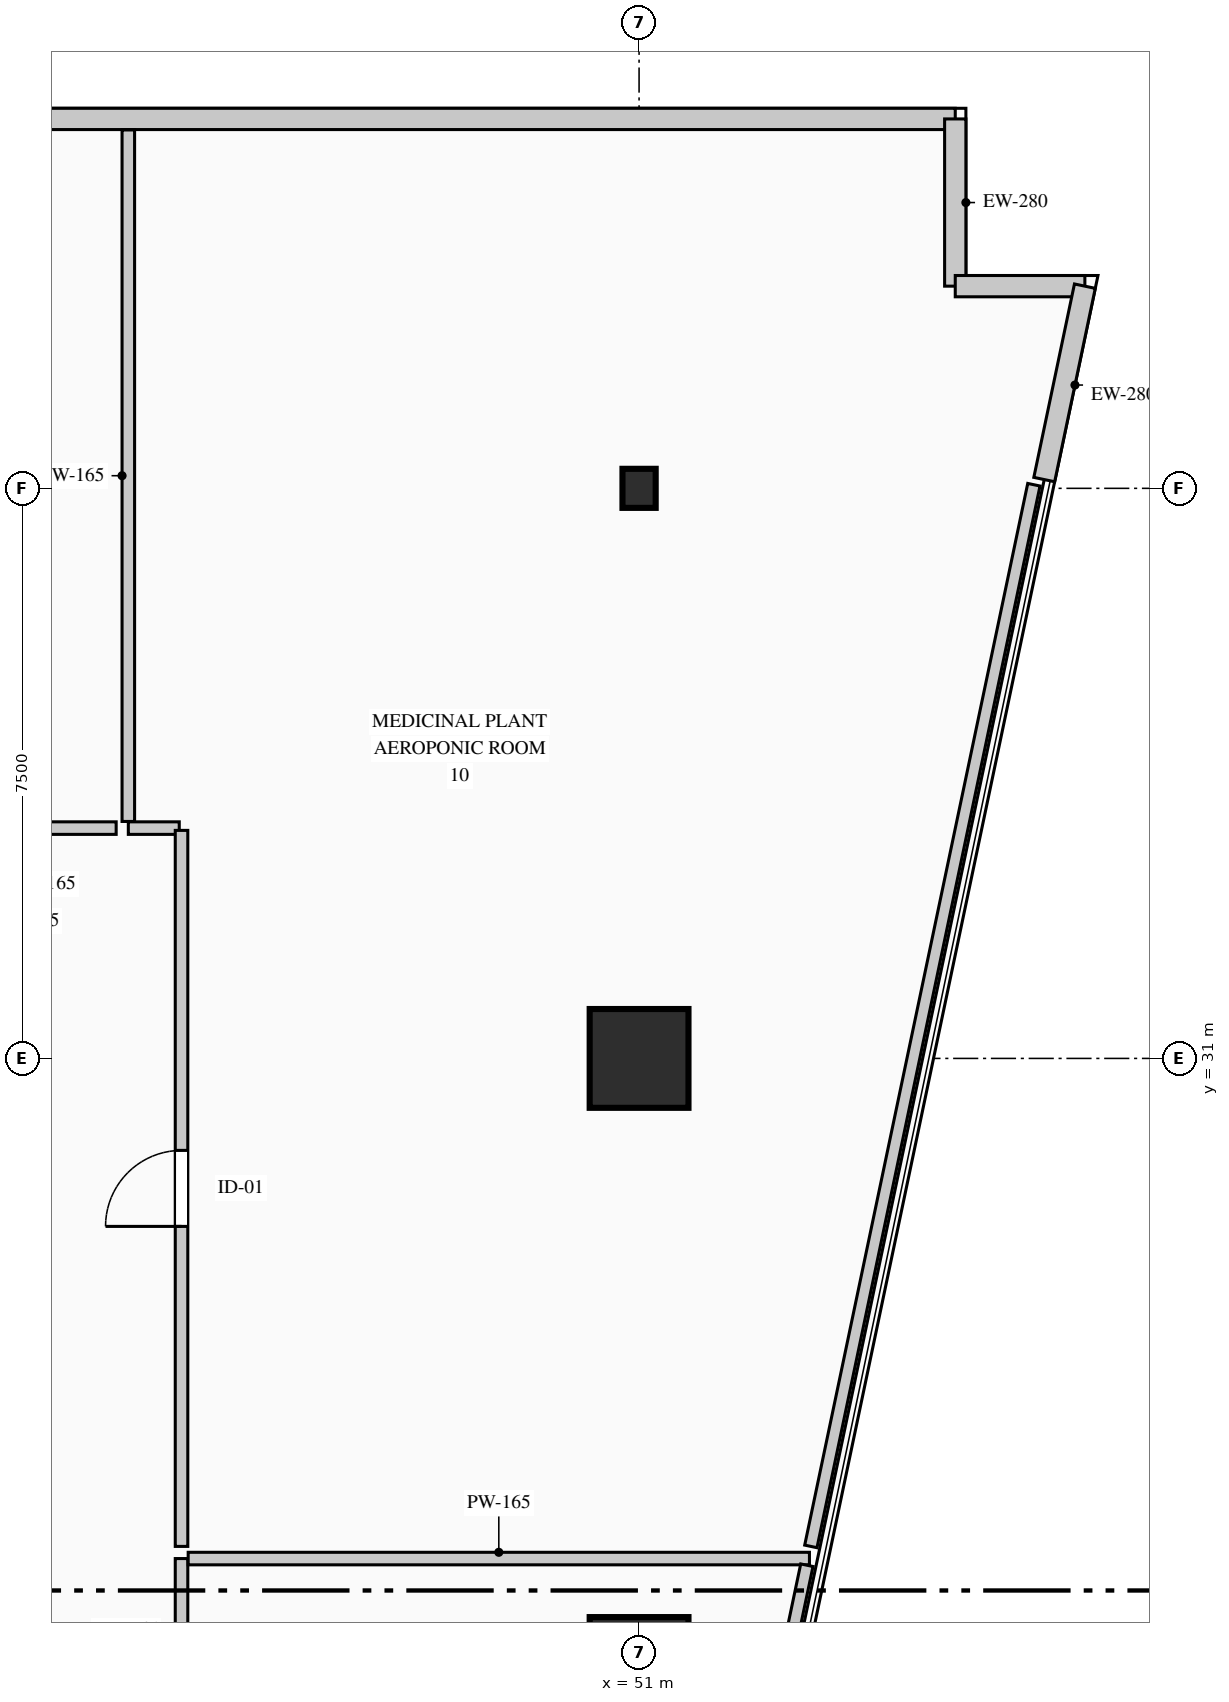
"""IFC4 building model, lengths in metres.
Left out: names, types, materials, properties, quantities, classifications, styles, units other than length and angle.
Written with IfcOpenShell. Run it as: python <this file> out.ifc"""

import sys

from ifc_helpers import new_model, si_unit, direction, frame, frame_2d, origin, origin_2d, place, context, subcontext, project, spatial, rectangle, i_section, extrude, element, fill, save


model = new_model("IFC4")
c1 = context("Model", 3, precision=1e-05, world=origin(), true_north=direction((0.0, 1.0)))
c2 = subcontext(c1, "Body", "Model", "MODEL_VIEW")
j1 = project(units=[si_unit("LENGTHUNIT", "METRE"), si_unit("PLANEANGLEUNIT", "RADIAN")], contexts=[c1])
p1 = place(None, origin())
s1 = spatial("IfcSite", under=j1, at=p1, CompositionType="ELEMENT")
p2 = place(p1, origin())
s2 = spatial("IfcBuilding", under=s1, at=p2, CompositionType="ELEMENT")
p3 = place(p2, frame((0.0, 0.0, 75.4)))
s3 = spatial("IfcBuildingStorey", under=s2, at=p3, CompositionType="ELEMENT", Elevation=75.4)
for number, where, z_axis, x_axis in (
    (1, (51.0, 23.0, 0.0), (0.0, 0.0, 1.0), (1.0, 0.0, 0.0)),
    (2, (51.0, 31.0, 0.0), (0.0, 0.0, 1.0), (1.0, 0.0, 0.0)),
):
    element("IfcColumn", number, at=place(p3, frame(where, z_axis=z_axis, x_axis=x_axis)), inside=s3, PredefinedType="COLUMN", context=c2, shape_type="SweptSolid", body=[
        extrude(rectangle(XDim=1.3, YDim=1.3, at=origin_2d()), origin(), (0.0, 0.0, 1.0), 4.4),
    ])
p4 = place(p3, frame((51.0, 38.5, 0.0), z_axis=(0.0, 0.0, 1.0), x_axis=(1.0, 0.0, 0.0)))
e3 = element("IfcColumn", 3, at=p4, inside=s3, PredefinedType="COLUMN", context=c2, shape_type="SweptSolid", body=[
    extrude(i_section(OverallWidth=0.437, OverallDepth=0.514, WebThickness=0.061, FlangeThickness=0.077, FilletRadius=0.015, at=origin_2d()), origin(), (0.0, 0.0, 1.0), 4.4),
])
p5 = place(p3, frame((4.84, 43.36, 0.0), z_axis=(0.0, 0.0, 1.0), x_axis=(1.0, 0.0, 0.0)))
e4 = element("IfcWall", 4, at=p5, inside=s3, PredefinedType="STANDARD", context=c2, shape_type="SweptSolid", body=[
    extrude(rectangle(XDim=50.32, YDim=0.28, at=frame_2d((25.16, 0.0))), origin(), (0.0, 0.0, 1.0), 4.115),
])
p6 = place(p5, frame((24.26, 0.0, 0.9)))
e5 = element("IfcOpeningElement", 5, at=p6, cuts=e4, PredefinedType="OPENING", context=c2, shape_type="SweptSolid", body=[
    extrude(rectangle(XDim=1.8, YDim=2.1, at=frame_2d((0.9, 1.05))), frame((0.0, 0.15, 0.0), z_axis=(0.0, -1.0, 0.0), x_axis=(1.0, 0.0, 0.0)), (0.0, 0.0, 1.0), 0.3),
])
p7 = place(p3, frame((55.16, 43.36, 0.0), z_axis=(0.0, 0.0, 1.0), x_axis=(0.0, -1.0, 0.0)))
e6 = element("IfcWall", 6, at=p7, inside=s3, PredefinedType="STANDARD", context=c2, shape_type="SweptSolid", body=[
    extrude(rectangle(XDim=2.2, YDim=0.28, at=frame_2d((1.1, 0.0))), origin(), (0.0, 0.0, 1.0), 4.115),
])
p8 = place(p3, frame((55.16, 41.16, 0.0), z_axis=(0.0, 0.0, 1.0), x_axis=(1.0, 0.0, 0.0)))
e7 = element("IfcWall", 7, at=p8, inside=s3, PredefinedType="STANDARD", context=c2, shape_type="SweptSolid", body=[
    extrude(rectangle(XDim=1.705, YDim=0.28, at=frame_2d((0.853, 0.0))), origin(), (0.0, 0.0, 1.0), 4.115),
])
p9 = place(p3, frame((56.865, 41.16, 0.0), z_axis=(0.0, 0.0, 1.0), x_axis=(-0.205551409765, -0.978646319128, 0.0)))
e8 = element("IfcWall", 8, at=p9, inside=s3, PredefinedType="STANDARD", context=c2, shape_type="SweptSolid", body=[
    extrude(rectangle(XDim=2.6, YDim=0.28, at=frame_2d((1.3, 0.0))), origin(), (0.0, 0.0, 1.0), 4.115),
])
p10 = place(p3, frame((44.98, 18.73, 0.0), z_axis=(0.0, 0.0, 1.0), x_axis=(0.0, 1.0, 0.0)))
e9 = element("IfcWall", 9, at=p10, inside=s3, PredefinedType="PARTITIONING", context=c2, shape_type="SweptSolid", body=[
    extrude(rectangle(XDim=5.69, YDim=0.165, at=frame_2d((2.845, 0.0))), origin(), (0.0, 0.0, 1.0), 4.115),
])
p11 = place(p10, frame((2.345, 0.0, 0.0)))
e10 = element("IfcOpeningElement", 10, at=p11, cuts=e9, PredefinedType="OPENING", context=c2, shape_type="SweptSolid", body=[
    extrude(rectangle(XDim=1.0, YDim=2.15, at=frame_2d((0.5, 1.075))), frame((0.0, 0.093, 0.0), z_axis=(0.0, -1.0, 0.0), x_axis=(1.0, 0.0, 0.0)), (0.0, 0.0, 1.0), 0.185),
])
p12 = place(p3, frame((45.067, 24.42, 0.0), z_axis=(0.0, 0.0, 1.0), x_axis=(1.0, 0.0, 0.0)))
e11 = element("IfcWall", 11, at=p12, inside=s3, PredefinedType="PARTITIONING", context=c2, shape_type="SweptSolid", body=[
    extrude(rectangle(XDim=8.174, YDim=0.165, at=frame_2d((4.087, 0.0))), origin(), (0.0, 0.0, 1.0), 4.115),
])
p13 = place(p3, frame((53.208, 24.333, 0.0), z_axis=(0.0, 0.0, 1.0), x_axis=(-0.20551396666, -0.978654182798, 0.0)))
e12 = element("IfcWall", 12, at=p13, inside=s3, PredefinedType="PARTITIONING", context=c2, shape_type="SweptSolid", body=[
    extrude(rectangle(XDim=5.725, YDim=0.165, at=frame_2d((2.862, 0.0))), origin(), (0.0, 0.0, 1.0), 4.115),
])
p14 = place(p3, frame((44.95, 34.03, 0.0), z_axis=(0.0, 0.0, 1.0), x_axis=(-1.0, 0.0, 0.0)))
e13 = element("IfcWall", 13, at=p14, inside=s3, PredefinedType="PARTITIONING", context=c2, shape_type="SweptSolid", body=[
    extrude(rectangle(XDim=0.67, YDim=0.165, at=frame_2d((0.335, 0.0))), origin(), (0.0, 0.0, 1.0), 4.115),
])
p15 = place(p3, frame((44.28, 34.117, 0.0), z_axis=(0.0, 0.0, 1.0), x_axis=(0.0, 1.0, 0.0)))
e14 = element("IfcWall", 14, at=p15, inside=s3, PredefinedType="PARTITIONING", context=c2, shape_type="SweptSolid", body=[
    extrude(rectangle(XDim=9.098, YDim=0.165, at=frame_2d((4.549, 0.0))), origin(), (0.0, 0.0, 1.0), 3.74),
])
p16 = place(p3, frame((56.194, 38.548, 0.0), z_axis=(0.0, 0.0, 1.0), x_axis=(-0.205594071113, -0.978637357719, 0.0)))
e15 = element("IfcWall", 15, at=p16, inside=s3, PredefinedType="PARTITIONING", context=c2, shape_type="SweptSolid", body=[
    extrude(rectangle(XDim=14.272, YDim=0.165, at=frame_2d((7.136, 0.0))), origin(), (0.0, 0.0, 1.0), 4.115),
])
p17 = place(p3, frame((44.98, 24.58, 0.0), z_axis=(0.0, 0.0, 1.0), x_axis=(0.0, 1.0, 0.0)))
e16 = element("IfcWall", 16, at=p17, inside=s3, PredefinedType="PARTITIONING", context=c2, shape_type="SweptSolid", body=[
    extrude(rectangle(XDim=9.42, YDim=0.165, at=frame_2d((4.71, 0.0))), origin(), (0.0, 0.0, 1.0), 3.74),
])
p18 = place(p17, frame((4.21, 0.0, 0.0)))
e17 = element("IfcOpeningElement", 17, at=p18, cuts=e16, PredefinedType="OPENING", context=c2, shape_type="SweptSolid", body=[
    extrude(rectangle(XDim=1.0, YDim=2.15, at=frame_2d((0.5, 1.075))), frame((0.0, 0.093, 0.0), z_axis=(0.0, -1.0, 0.0), x_axis=(1.0, 0.0, 0.0)), (0.0, 0.0, 1.0), 0.185),
])
p19 = place(p3, frame((44.12, 34.03, 0.0), z_axis=(0.0, 0.0, 1.0), x_axis=(-1.0, 0.0, 0.0)))
e18 = element("IfcWall", 18, at=p19, inside=s3, PredefinedType="PARTITIONING", context=c2, shape_type="SweptSolid", body=[
    extrude(rectangle(XDim=1.9, YDim=0.165, at=frame_2d((0.95, 0.0))), origin(), (0.0, 0.0, 1.0), 4.115),
])
p20 = place(p18, origin())
e19 = element("IfcDoor", 19, at=p20, inside=s3, OperationType="SINGLE_SWING_LEFT", PredefinedType="DOOR", context=c2, shape_type="SweptSolid", body=[
    extrude(rectangle(XDim=1.0, YDim=2.15, at=frame_2d((0.5, 1.075))), frame((0.0, 0.025, 0.0), z_axis=(0.0, -1.0, 0.0), x_axis=(1.0, 0.0, 0.0)), (0.0, 0.0, 1.0), 0.05),
])
fill(e17, e19)
save(model, sys.argv[1])
